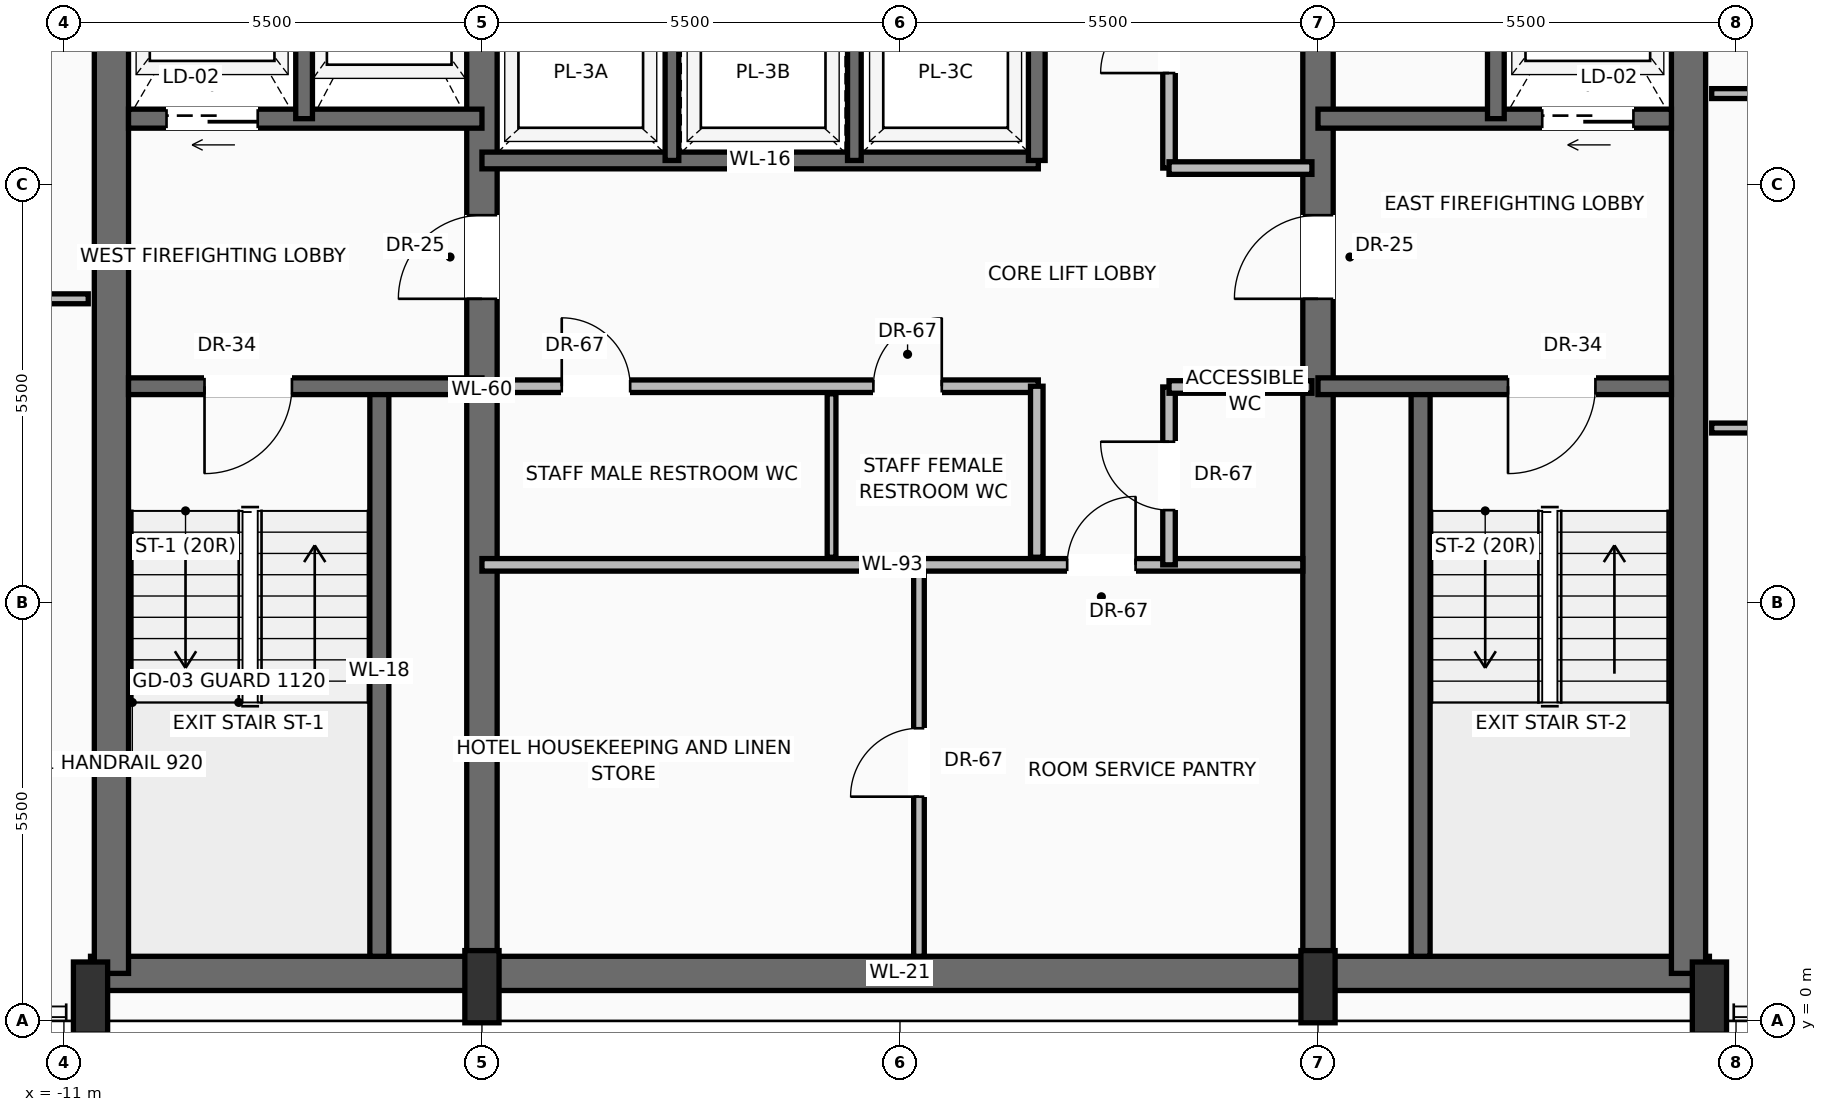
"""IFC4 building model, lengths in metres.
Left out: names, types, materials, properties, quantities, classifications, styles, units other than length and angle.
Written with IfcOpenShell. Run it as: python <this file> out.ifc"""

import sys

from ifc_helpers import new_model, si_unit, direction, frame, frame_2d, origin, origin_2d, place, context, subcontext, project, spatial, rectangle, extrude, source, transform, mapped, element, fill, save


model = new_model("IFC4")
c1 = context("Model", 3, precision=1e-05, world=origin(), true_north=direction((0.0, 1.0)))
c2 = subcontext(c1, "Body", "Model", "MODEL_VIEW")
j1 = project(units=[si_unit("LENGTHUNIT", "METRE"), si_unit("PLANEANGLEUNIT", "RADIAN")], contexts=[c1])
p1 = place(None, origin())
s1 = spatial("IfcSite", under=j1, at=p1, CompositionType="ELEMENT")
p2 = place(p1, origin())
s2 = spatial("IfcBuilding", under=s1, at=p2, CompositionType="ELEMENT")
p3 = place(p2, frame((0.0, 0.0, 300.6)))
s3 = spatial("IfcBuildingStorey", under=s2, at=p3, CompositionType="ELEMENT", Elevation=300.6)
p4 = place(p3, frame((-10.65, 0.625, 0.0), z_axis=(0.0, 0.0, 1.0), x_axis=(1.0, 0.0, 0.0)))
e1 = element("IfcWall", 1, at=p4, inside=s3, PredefinedType="SHEAR", context=c2, shape_type="SweptSolid", body=[
    extrude(rectangle(XDim=21.3, YDim=0.45, at=frame_2d((10.65, 0.0))), origin(), (0.0, 0.0, 1.0), 3.15),
])
for number, where, z_axis, x_axis in (
    (2, (-10.375, 0.625, 0.0), (0.0, 0.0, 1.0), (0.0, 1.0, 0.0)),
    (3, (10.375, 0.625, 0.0), (0.0, 0.0, 1.0), (0.0, 1.0, 0.0)),
):
    element("IfcWall", number, at=place(p3, frame(where, z_axis=z_axis, x_axis=x_axis)), inside=s3, PredefinedType="SHEAR", context=c2, shape_type="SweptSolid", body=[
        extrude(rectangle(XDim=15.35, YDim=0.45, at=frame_2d((7.675, 0.0))), origin(), (0.0, 0.0, 1.0), 3.15),
    ])
p5 = place(p3, frame((-5.5, 0.625, 0.0), z_axis=(0.0, 0.0, 1.0), x_axis=(0.0, 1.0, 0.0)))
e4 = element("IfcWall", 4, at=p5, inside=s3, PredefinedType="SHEAR", context=c2, shape_type="SweptSolid", body=[
    extrude(rectangle(XDim=15.35, YDim=0.4, at=frame_2d((7.675, 0.0))), origin(), (0.0, 0.0, 1.0), 3.15),
])
p6 = place(p5, frame((8.875, 0.0, 0.0)))
e5 = element("IfcOpeningElement", 5, at=p6, cuts=e4, PredefinedType="OPENING", context=c2, shape_type="SweptSolid", body=[
    extrude(rectangle(XDim=1.1, YDim=2.2, at=frame_2d((0.55, 1.1))), frame((0.0, 0.21, 0.0), z_axis=(0.0, -1.0, 0.0), x_axis=(1.0, 0.0, 0.0)), (0.0, 0.0, 1.0), 0.42),
])
p7 = place(p3, frame((5.5, 0.625, 0.0), z_axis=(0.0, 0.0, 1.0), x_axis=(0.0, 1.0, 0.0)))
e6 = element("IfcWall", 6, at=p7, inside=s3, PredefinedType="SHEAR", context=c2, shape_type="SweptSolid", body=[
    extrude(rectangle(XDim=15.35, YDim=0.4, at=frame_2d((7.675, 0.0))), origin(), (0.0, 0.0, 1.0), 3.15),
])
p8 = place(p7, frame((8.875, 0.0, 0.0)))
e7 = element("IfcOpeningElement", 7, at=p8, cuts=e6, PredefinedType="OPENING", context=c2, shape_type="SweptSolid", body=[
    extrude(rectangle(XDim=1.1, YDim=2.2, at=frame_2d((0.55, 1.1))), frame((0.0, 0.21, 0.0), z_axis=(0.0, -1.0, 0.0), x_axis=(1.0, 0.0, 0.0)), (0.0, 0.0, 1.0), 0.42),
])
m1 = source(origin(), c2, "Body", "SweptSolid", [
    extrude(rectangle(XDim=0.45, YDim=0.95, at=origin_2d()), origin(), (0.0, 0.0, 1.0), 3.45),
])
for number, where, z_axis, x_axis in (
    (8, (-10.65, 0.3, 0.0), (0.0, 0.0, 1.0), (1.0, 0.0, 0.0)),
    (9, (-5.5, 0.45, 0.0), (0.0, 0.0, 1.0), (1.0, 0.0, 0.0)),
    (10, (5.5, 0.45, 0.0), (0.0, 0.0, 1.0), (1.0, 0.0, 0.0)),
    (11, (10.65, 0.3, 0.0), (0.0, 0.0, 1.0), (1.0, 0.0, 0.0)),
):
    element("IfcColumn", number, at=place(p3, frame(where, z_axis=z_axis, x_axis=x_axis)), inside=s3, PredefinedType="PILASTER", context=c2, shape_type="MappedRepresentation", body=[
        mapped(m1, transform((0.0, 0.0, 0.0), scale=1.0)),
    ])
p9 = place(p3, frame((-6.85, 0.85, 0.0), z_axis=(0.0, 0.0, 1.0), x_axis=(0.0, 1.0, 0.0)))
e12 = element("IfcWall", 12, at=p9, inside=s3, PredefinedType="SOLIDWALL", context=c2, shape_type="SweptSolid", body=[
    extrude(rectangle(XDim=7.5, YDim=0.25, at=frame_2d((3.75, 0.0))), origin(), (0.0, 0.0, 1.0), 3.15),
])
p10 = place(p3, frame((-5.5, 8.35, 0.0), z_axis=(0.0, 0.0, 1.0), x_axis=(-1.0, 0.0, 0.0)))
e13 = element("IfcWall", 13, at=p10, inside=s3, PredefinedType="SOLIDWALL", context=c2, shape_type="SweptSolid", body=[
    extrude(rectangle(XDim=4.65, YDim=0.22, at=frame_2d((2.325, 0.0))), origin(), (0.0, 0.0, 1.0), 3.15),
])
p11 = place(p10, frame((2.5, 0.0, 0.0)))
e14 = element("IfcOpeningElement", 14, at=p11, cuts=e13, PredefinedType="OPENING", context=c2, shape_type="SweptSolid", body=[
    extrude(rectangle(XDim=1.15, YDim=2.2, at=frame_2d((0.575, 1.1))), frame((0.0, 0.12, 0.0), z_axis=(0.0, -1.0, 0.0), x_axis=(1.0, 0.0, 0.0)), (0.0, 0.0, 1.0), 0.24),
])
p12 = place(p3, frame((-5.5, 11.87, 0.0), z_axis=(0.0, 0.0, 1.0), x_axis=(-1.0, 0.0, 0.0)))
e15 = element("IfcWall", 15, at=p12, inside=s3, PredefinedType="SOLIDWALL", context=c2, shape_type="SweptSolid", body=[
    extrude(rectangle(XDim=4.65, YDim=0.25, at=frame_2d((2.325, 0.0))), origin(), (0.0, 0.0, 1.0), 3.15),
])
p13 = place(p12, frame((2.95, 0.0, 0.0)))
e16 = element("IfcOpeningElement", 16, at=p13, cuts=e15, PredefinedType="OPENING", context=c2, shape_type="SweptSolid", body=[
    extrude(rectangle(XDim=1.2, YDim=2.25, at=frame_2d((0.6, 1.125))), frame((0.0, 0.135, 0.0), z_axis=(0.0, -1.0, 0.0), x_axis=(1.0, 0.0, 0.0)), (0.0, 0.0, 1.0), 0.27),
])
p14 = place(p3, frame((-7.84, 11.87, 0.0), z_axis=(0.0, 0.0, 1.0), x_axis=(0.0, 1.0, 0.0)))
e17 = element("IfcWall", 17, at=p14, inside=s3, PredefinedType="SOLIDWALL", context=c2, shape_type="SweptSolid", body=[
    extrude(rectangle(XDim=3.88, YDim=0.22, at=frame_2d((1.94, 0.0))), origin(), (0.0, 0.0, 1.0), 3.15),
])
p15 = place(p3, frame((6.85, 0.85, 0.0), z_axis=(0.0, 0.0, 1.0), x_axis=(0.0, 1.0, 0.0)))
e18 = element("IfcWall", 18, at=p15, inside=s3, PredefinedType="SOLIDWALL", context=c2, shape_type="SweptSolid", body=[
    extrude(rectangle(XDim=7.5, YDim=0.25, at=frame_2d((3.75, 0.0))), origin(), (0.0, 0.0, 1.0), 3.15),
])
p16 = place(p3, frame((10.15, 8.35, 0.0), z_axis=(0.0, 0.0, 1.0), x_axis=(-1.0, 0.0, 0.0)))
e19 = element("IfcWall", 19, at=p16, inside=s3, PredefinedType="SOLIDWALL", context=c2, shape_type="SweptSolid", body=[
    extrude(rectangle(XDim=4.65, YDim=0.22, at=frame_2d((2.325, 0.0))), origin(), (0.0, 0.0, 1.0), 3.15),
])
p17 = place(p16, frame((1.0, 0.0, 0.0)))
e20 = element("IfcOpeningElement", 20, at=p17, cuts=e19, PredefinedType="OPENING", context=c2, shape_type="SweptSolid", body=[
    extrude(rectangle(XDim=1.15, YDim=2.2, at=frame_2d((0.575, 1.1))), frame((0.0, 0.12, 0.0), z_axis=(0.0, -1.0, 0.0), x_axis=(1.0, 0.0, 0.0)), (0.0, 0.0, 1.0), 0.24),
])
p18 = place(p3, frame((10.15, 11.87, 0.0), z_axis=(0.0, 0.0, 1.0), x_axis=(-1.0, 0.0, 0.0)))
e21 = element("IfcWall", 21, at=p18, inside=s3, PredefinedType="SOLIDWALL", context=c2, shape_type="SweptSolid", body=[
    extrude(rectangle(XDim=4.65, YDim=0.25, at=frame_2d((2.325, 0.0))), origin(), (0.0, 0.0, 1.0), 3.15),
])
p19 = place(p18, frame((0.5, 0.0, 0.0)))
e22 = element("IfcOpeningElement", 22, at=p19, cuts=e21, PredefinedType="OPENING", context=c2, shape_type="SweptSolid", body=[
    extrude(rectangle(XDim=1.2, YDim=2.25, at=frame_2d((0.6, 1.125))), frame((0.0, 0.135, 0.0), z_axis=(0.0, -1.0, 0.0), x_axis=(1.0, 0.0, 0.0)), (0.0, 0.0, 1.0), 0.27),
])
p20 = place(p3, frame((7.84, 11.87, 0.0), z_axis=(0.0, 0.0, 1.0), x_axis=(0.0, 1.0, 0.0)))
e23 = element("IfcWall", 23, at=p20, inside=s3, PredefinedType="SOLIDWALL", context=c2, shape_type="SweptSolid", body=[
    extrude(rectangle(XDim=3.88, YDim=0.22, at=frame_2d((1.94, 0.0))), origin(), (0.0, 0.0, 1.0), 3.15),
])
p21 = place(p3, frame((-5.5, 6.0, 0.0), z_axis=(0.0, 0.0, 1.0), x_axis=(1.0, 0.0, 0.0)))
e24 = element("IfcWall", 24, at=p21, inside=s3, PredefinedType="PARTITIONING", context=c2, shape_type="SweptSolid", body=[
    extrude(rectangle(XDim=10.8, YDim=0.165, at=frame_2d((5.4, 0.0))), origin(), (0.0, 0.0, 1.0), 3.142),
])
p22 = place(p21, frame((7.7, 0.0, 0.0)))
e25 = element("IfcOpeningElement", 25, at=p22, cuts=e24, PredefinedType="OPENING", context=c2, shape_type="SweptSolid", body=[
    extrude(rectangle(XDim=0.9, YDim=2.1, at=frame_2d((0.45, 1.05))), frame((0.0, 0.093, 0.0), z_axis=(0.0, -1.0, 0.0), x_axis=(1.0, 0.0, 0.0)), (0.0, 0.0, 1.0), 0.185),
])
p23 = place(p3, frame((0.25, 0.85, 0.0), z_axis=(0.0, 0.0, 1.0), x_axis=(0.0, 1.0, 0.0)))
e26 = element("IfcWall", 26, at=p23, inside=s3, PredefinedType="PARTITIONING", context=c2, shape_type="SweptSolid", body=[
    extrude(rectangle(XDim=5.03, YDim=0.14, at=frame_2d((2.515, 0.0))), origin(), (0.0, 0.0, 1.0), 3.142),
])
p24 = place(p23, frame((2.1, 0.0, 0.0)))
e27 = element("IfcOpeningElement", 27, at=p24, cuts=e26, PredefinedType="OPENING", context=c2, shape_type="SweptSolid", body=[
    extrude(rectangle(XDim=0.9, YDim=2.1, at=frame_2d((0.45, 1.05))), frame((0.0, 0.08, 0.0), z_axis=(0.0, -1.0, 0.0), x_axis=(1.0, 0.0, 0.0)), (0.0, 0.0, 1.0), 0.16),
])
p25 = place(p3, frame((3.54, 6.0, 0.0), z_axis=(0.0, 0.0, 1.0), x_axis=(0.0, 1.0, 0.0)))
e28 = element("IfcWall", 28, at=p25, inside=s3, PredefinedType="PARTITIONING", context=c2, shape_type="SweptSolid", body=[
    extrude(rectangle(XDim=2.34, YDim=0.165, at=frame_2d((1.17, 0.0))), origin(), (0.0, 0.0, 1.0), 3.142),
])
p26 = place(p25, frame((0.72, 0.0, 0.0)))
e29 = element("IfcOpeningElement", 29, at=p26, cuts=e28, PredefinedType="OPENING", context=c2, shape_type="SweptSolid", body=[
    extrude(rectangle(XDim=0.9, YDim=2.1, at=frame_2d((0.45, 1.05))), frame((0.0, 0.093, 0.0), z_axis=(0.0, -1.0, 0.0), x_axis=(1.0, 0.0, 0.0)), (0.0, 0.0, 1.0), 0.185),
])
p27 = place(p3, frame((3.54, 8.34, 0.0), z_axis=(0.0, 0.0, 1.0), x_axis=(1.0, 0.0, 0.0)))
e30 = element("IfcWall", 30, at=p27, inside=s3, PredefinedType="PARTITIONING", context=c2, shape_type="SweptSolid", body=[
    extrude(rectangle(XDim=1.88, YDim=0.165, at=frame_2d((0.94, 0.0))), origin(), (0.0, 0.0, 1.0), 3.142),
])
p28 = place(p3, frame((-5.3, 8.35, 0.0), z_axis=(0.0, 0.0, 1.0), x_axis=(1.0, 0.0, 0.0)))
e31 = element("IfcWall", 31, at=p28, inside=s3, PredefinedType="PARTITIONING", context=c2, shape_type="SweptSolid", body=[
    extrude(rectangle(XDim=7.12, YDim=0.165, at=frame_2d((3.56, 0.0))), origin(), (0.0, 0.0, 1.0), 3.142),
])
p29 = place(p28, frame((0.85, 0.0, 0.0)))
e32 = element("IfcOpeningElement", 32, at=p29, cuts=e31, PredefinedType="OPENING", context=c2, shape_type="SweptSolid", body=[
    extrude(rectangle(XDim=0.9, YDim=2.1, at=frame_2d((0.45, 1.05))), frame((0.0, 0.093, 0.0), z_axis=(0.0, -1.0, 0.0), x_axis=(1.0, 0.0, 0.0)), (0.0, 0.0, 1.0), 0.185),
])
p30 = place(p28, frame((4.95, 0.0, 0.0)))
e33 = element("IfcOpeningElement", 33, at=p30, cuts=e31, PredefinedType="OPENING", context=c2, shape_type="SweptSolid", body=[
    extrude(rectangle(XDim=0.9, YDim=2.1, at=frame_2d((0.45, 1.05))), frame((0.0, 0.093, 0.0), z_axis=(0.0, -1.0, 0.0), x_axis=(1.0, 0.0, 0.0)), (0.0, 0.0, 1.0), 0.185),
])
p31 = place(p3, frame((1.8, 6.1, 0.0), z_axis=(0.0, 0.0, 1.0), x_axis=(0.0, 1.0, 0.0)))
e34 = element("IfcWall", 34, at=p31, inside=s3, PredefinedType="PARTITIONING", context=c2, shape_type="SweptSolid", body=[
    extrude(rectangle(XDim=2.25, YDim=0.165, at=frame_2d((1.125, 0.0))), origin(), (0.0, 0.0, 1.0), 3.142),
])
p32 = place(p3, frame((-0.9, 6.1, 0.0), z_axis=(0.0, 0.0, 1.0), x_axis=(0.0, 1.0, 0.0)))
e35 = element("IfcWall", 35, at=p32, inside=s3, PredefinedType="PARTITIONING", context=c2, shape_type="SweptSolid", body=[
    extrude(rectangle(XDim=2.15, YDim=0.115, at=frame_2d((1.075, 0.0))), origin(), (0.0, 0.0, 1.0), 3.142),
])
p33 = place(p3, frame((-5.5, 11.32, 0.0), z_axis=(0.0, 0.0, 1.0), x_axis=(1.0, 0.0, 0.0)))
e36 = element("IfcWall", 36, at=p33, inside=s3, PredefinedType="SOLIDWALL", context=c2, shape_type="SweptSolid", body=[
    extrude(rectangle(XDim=7.32, YDim=0.22, at=frame_2d((3.66, 0.0))), origin(), (0.0, 0.0, 1.0), 3.15),
])
p34 = place(p3, frame((1.8, 11.32, 0.0), z_axis=(0.0, 0.0, 1.0), x_axis=(0.0, 1.0, 0.0)))
e37 = element("IfcWall", 37, at=p34, inside=s3, PredefinedType="SOLIDWALL", context=c2, shape_type="SweptSolid", body=[
    extrude(rectangle(XDim=2.3, YDim=0.22, at=frame_2d((1.15, 0.0))), origin(), (0.0, 0.0, 1.0), 3.15),
])
for number, where, z_axis, x_axis in (
    (38, (-3.0, 11.32, 0.0), (0.0, 0.0, 1.0), (0.0, 1.0, 0.0)),
    (39, (-0.6, 11.32, 0.0), (0.0, 0.0, 1.0), (0.0, 1.0, 0.0)),
):
    element("IfcWall", number, at=place(p3, frame(where, z_axis=z_axis, x_axis=x_axis)), inside=s3, PredefinedType="SOLIDWALL", context=c2, shape_type="SweptSolid", body=[
        extrude(rectangle(XDim=2.3, YDim=0.18, at=frame_2d((1.15, 0.0))), origin(), (0.0, 0.0, 1.0), 3.15),
    ])
p35 = place(p3, frame((3.54, 11.22, 0.0), z_axis=(0.0, 0.0, 1.0), x_axis=(0.0, 1.0, 0.0)))
e40 = element("IfcWall", 40, at=p35, inside=s3, PredefinedType="PARTITIONING", context=c2, shape_type="SweptSolid", body=[
    extrude(rectangle(XDim=4.53, YDim=0.165, at=frame_2d((2.265, 0.0))), origin(), (0.0, 0.0, 1.0), 3.142),
])
p36 = place(p35, frame((1.25, 0.0, 0.0)))
e41 = element("IfcOpeningElement", 41, at=p36, cuts=e40, PredefinedType="OPENING", context=c2, shape_type="SweptSolid", body=[
    extrude(rectangle(XDim=0.9, YDim=2.1, at=frame_2d((0.45, 1.05))), frame((0.0, 0.093, 0.0), z_axis=(0.0, -1.0, 0.0), x_axis=(1.0, 0.0, 0.0)), (0.0, 0.0, 1.0), 0.185),
])
p37 = place(p3, frame((3.54, 11.22, 0.0), z_axis=(0.0, 0.0, 1.0), x_axis=(1.0, 0.0, 0.0)))
e42 = element("IfcWall", 42, at=p37, inside=s3, PredefinedType="PARTITIONING", context=c2, shape_type="SweptSolid", body=[
    extrude(rectangle(XDim=1.88, YDim=0.165, at=frame_2d((0.94, 0.0))), origin(), (0.0, 0.0, 1.0), 3.142),
])
p38 = place(p3, frame((-20.302, 9.5, 0.0), z_axis=(0.0, 0.0, 1.0), x_axis=(1.0, 0.0, 0.0)))
e43 = element("IfcWall", 43, at=p38, inside=s3, PredefinedType="PARTITIONING", context=c2, shape_type="SweptSolid", body=[
    extrude(rectangle(XDim=9.623, YDim=0.13, at=frame_2d((4.811, 0.0))), origin(), (0.0, 0.0, 1.0), 3.142),
])
p39 = place(p38, frame((3.889, 0.0, 0.0)))
e44 = element("IfcOpeningElement", 44, at=p39, cuts=e43, PredefinedType="OPENING", context=c2, shape_type="SweptSolid", body=[
    extrude(rectangle(XDim=0.95, YDim=2.2, at=frame_2d((0.475, 1.1))), frame((0.0, 0.075, 0.0), z_axis=(0.0, -1.0, 0.0), x_axis=(1.0, 0.0, 0.0)), (0.0, 0.0, 1.0), 0.15),
])
p40 = place(p3, frame((10.68, 7.8, 0.0), z_axis=(0.0, 0.0, 1.0), x_axis=(1.0, 0.0, 0.0)))
e45 = element("IfcWall", 45, at=p40, inside=s3, PredefinedType="PARTITIONING", context=c2, shape_type="SweptSolid", body=[
    extrude(rectangle(XDim=10.595, YDim=0.13, at=frame_2d((5.298, 0.0))), origin(), (0.0, 0.0, 1.0), 3.142),
])
p41 = place(p40, frame((4.327, 0.0, 0.0)))
e46 = element("IfcOpeningElement", 46, at=p41, cuts=e45, PredefinedType="OPENING", context=c2, shape_type="SweptSolid", body=[
    extrude(rectangle(XDim=0.95, YDim=2.2, at=frame_2d((0.475, 1.1))), frame((0.0, 0.075, 0.0), z_axis=(0.0, -1.0, 0.0), x_axis=(1.0, 0.0, 0.0)), (0.0, 0.0, 1.0), 0.15),
])
p42 = place(p3, frame((10.68, 12.2, 0.0), z_axis=(0.0, 0.0, 1.0), x_axis=(1.0, 0.0, 0.0)))
e47 = element("IfcWall", 47, at=p42, inside=s3, PredefinedType="PARTITIONING", context=c2, shape_type="SweptSolid", body=[
    extrude(rectangle(XDim=8.077, YDim=0.13, at=frame_2d((4.039, 0.0))), origin(), (0.0, 0.0, 1.0), 3.142),
])
p43 = place(p42, frame((3.194, 0.0, 0.0)))
e48 = element("IfcOpeningElement", 48, at=p43, cuts=e47, PredefinedType="OPENING", context=c2, shape_type="SweptSolid", body=[
    extrude(rectangle(XDim=0.95, YDim=2.2, at=frame_2d((0.475, 1.1))), frame((0.0, 0.075, 0.0), z_axis=(0.0, -1.0, 0.0), x_axis=(1.0, 0.0, 0.0)), (0.0, 0.0, 1.0), 0.15),
])
m2 = source(origin(), c2, "Body", "SweptSolid", [
    extrude(rectangle(XDim=1.15, YDim=2.2, at=frame_2d((0.575, 1.1))), frame((0.0, 0.025, 0.0), z_axis=(0.0, -1.0, 0.0), x_axis=(1.0, 0.0, 0.0)), (0.0, 0.0, 1.0), 0.05),
])
p44 = place(p11, origin())
e49 = element("IfcDoor", 49, at=p44, inside=s3, OperationType="SINGLE_SWING_RIGHT", PredefinedType="DOOR", context=c2, shape_type="MappedRepresentation", body=[
    mapped(m2, transform((0.0, 0.0, 0.0), scale=1.0)),
])
fill(e14, e49)
m3 = source(origin(), c2, "Body", "SweptSolid", [
    extrude(rectangle(XDim=1.1, YDim=2.2, at=frame_2d((0.55, 1.1))), frame((0.0, 0.025, 0.0), z_axis=(0.0, -1.0, 0.0), x_axis=(1.0, 0.0, 0.0)), (0.0, 0.0, 1.0), 0.05),
])
p45 = place(p6, origin())
e50 = element("IfcDoor", 50, at=p45, inside=s3, OperationType="SINGLE_SWING_LEFT", PredefinedType="DOOR", context=c2, shape_type="MappedRepresentation", body=[
    mapped(m3, transform((0.0, 0.0, 0.0), scale=1.0)),
])
fill(e5, e50)
m4 = source(origin(), c2, "Body", "SweptSolid", [
    extrude(rectangle(XDim=1.2, YDim=2.25, at=frame_2d((0.6, 1.125))), frame((0.0, 0.025, 0.0), z_axis=(0.0, -1.0, 0.0), x_axis=(1.0, 0.0, 0.0)), (0.0, 0.0, 1.0), 0.05),
])
p46 = place(p13, origin())
e51 = element("IfcDoor", 51, at=p46, inside=s3, OperationType="SLIDING_TO_LEFT", PredefinedType="DOOR", context=c2, shape_type="MappedRepresentation", body=[
    mapped(m4, transform((0.0, 0.0, 0.0), scale=1.0)),
])
fill(e16, e51)
p47 = place(p17, origin())
e52 = element("IfcDoor", 52, at=p47, inside=s3, OperationType="SINGLE_SWING_RIGHT", PredefinedType="DOOR", context=c2, shape_type="MappedRepresentation", body=[
    mapped(m2, transform((0.0, 0.0, 0.0), scale=1.0)),
])
fill(e20, e52)
p48 = place(p8, origin())
e53 = element("IfcDoor", 53, at=p48, inside=s3, OperationType="SINGLE_SWING_LEFT", PredefinedType="DOOR", context=c2, shape_type="MappedRepresentation", body=[
    mapped(m3, transform((0.0, 0.0, 0.0), scale=1.0)),
])
fill(e7, e53)
p49 = place(p19, origin())
e54 = element("IfcDoor", 54, at=p49, inside=s3, OperationType="SLIDING_TO_RIGHT", PredefinedType="DOOR", context=c2, shape_type="MappedRepresentation", body=[
    mapped(m4, transform((0.0, 0.0, 0.0), scale=1.0)),
])
fill(e22, e54)
m5 = source(origin(), c2, "Body", "SweptSolid", [
    extrude(rectangle(XDim=0.9, YDim=2.1, at=frame_2d((0.45, 1.05))), frame((0.0, 0.025, 0.0), z_axis=(0.0, -1.0, 0.0), x_axis=(1.0, 0.0, 0.0)), (0.0, 0.0, 1.0), 0.05),
])
p50 = place(p22, origin())
e55 = element("IfcDoor", 55, at=p50, inside=s3, OperationType="SINGLE_SWING_RIGHT", PredefinedType="DOOR", context=c2, shape_type="MappedRepresentation", body=[
    mapped(m5, transform((0.0, 0.0, 0.0), scale=1.0)),
])
fill(e25, e55)
p51 = place(p24, origin())
e56 = element("IfcDoor", 56, at=p51, inside=s3, OperationType="SINGLE_SWING_LEFT", PredefinedType="DOOR", context=c2, shape_type="MappedRepresentation", body=[
    mapped(m5, transform((0.0, 0.0, 0.0), scale=1.0)),
])
fill(e27, e56)
p52 = place(p26, origin())
e57 = element("IfcDoor", 57, at=p52, inside=s3, OperationType="SINGLE_SWING_RIGHT", PredefinedType="DOOR", context=c2, shape_type="MappedRepresentation", body=[
    mapped(m5, transform((0.0, 0.0, 0.0), scale=1.0)),
])
fill(e29, e57)
p53 = place(p29, origin())
e58 = element("IfcDoor", 58, at=p53, inside=s3, OperationType="SINGLE_SWING_LEFT", PredefinedType="DOOR", context=c2, shape_type="MappedRepresentation", body=[
    mapped(m5, transform((0.0, 0.0, 0.0), scale=1.0)),
])
fill(e32, e58)
p54 = place(p30, origin())
e59 = element("IfcDoor", 59, at=p54, inside=s3, OperationType="SINGLE_SWING_RIGHT", PredefinedType="DOOR", context=c2, shape_type="MappedRepresentation", body=[
    mapped(m5, transform((0.0, 0.0, 0.0), scale=1.0)),
])
fill(e33, e59)
p55 = place(p36, origin())
e60 = element("IfcDoor", 60, at=p55, inside=s3, OperationType="SINGLE_SWING_LEFT", PredefinedType="DOOR", context=c2, shape_type="MappedRepresentation", body=[
    mapped(m5, transform((0.0, 0.0, 0.0), scale=1.0)),
])
fill(e41, e60)
save(model, sys.argv[1])
